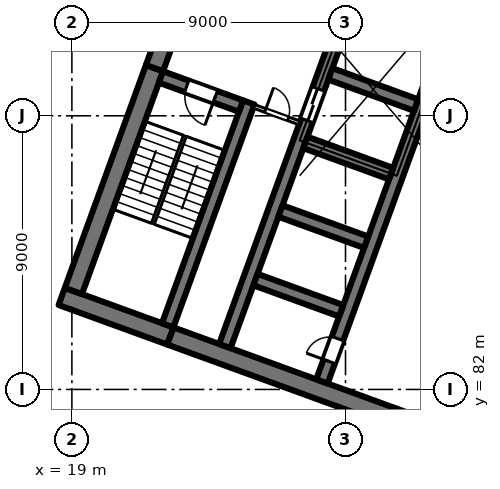
"""IFC4 building model, lengths in metres.
Left out: names, types, materials, properties, quantities, classifications, styles, units other than length and angle.
Written with IfcOpenShell. Run it as: python <this file> out.ifc"""

import sys

from ifc_helpers import new_model, si_unit, direction, frame, frame_2d, origin, place, context, subcontext, project, spatial, rectangle, extrude, element, fill, save


model = new_model("IFC4")
c1 = context("Model", 3, precision=1e-05, world=origin(), true_north=direction((0.0, 1.0)))
c2 = subcontext(c1, "Body", "Model", "MODEL_VIEW")
j1 = project(units=[si_unit("LENGTHUNIT", "METRE"), si_unit("PLANEANGLEUNIT", "RADIAN")], contexts=[c1])
p1 = place(None, origin())
s1 = spatial("IfcSite", under=j1, at=p1, CompositionType="ELEMENT")
p2 = place(p1, origin())
s2 = spatial("IfcBuilding", under=s1, at=p2, CompositionType="ELEMENT")
p3 = place(p2, frame((0.0, 0.0, 59.5)))
s3 = spatial("IfcBuildingStorey", under=s2, at=p3, CompositionType="ELEMENT", Elevation=59.5)
p4 = place(p3, frame((35.767, 78.835, 0.0), z_axis=(0.0, 0.0, 1.0), x_axis=(-0.939692894512, 0.342019391267, 0.0)))
e1 = element("IfcWall", 1, at=p4, inside=s3, PredefinedType="SHEAR", context=c2, shape_type="SweptSolid", body=[
    extrude(rectangle(XDim=14.4, YDim=0.6, at=frame_2d((7.2, 0.0))), origin(), (0.0, 0.0, 1.0), 4.0),
])
p5 = place(p3, frame((22.236, 83.76, 0.0), z_axis=(0.0, 0.0, 1.0), x_axis=(-0.939680822529, 0.342052557032, 0.0)))
e2 = element("IfcWall", 2, at=p5, inside=s3, PredefinedType="SHEAR", context=c2, shape_type="SweptSolid", body=[
    extrude(rectangle(XDim=3.8, YDim=0.6, at=frame_2d((1.9, 0.0))), origin(), (0.0, 0.0, 1.0), 4.0),
])
p6 = place(p3, frame((19.05, 85.239, 0.0), z_axis=(0.0, 0.0, 1.0), x_axis=(0.342016982193, 0.939693771338, 0.0)))
e3 = element("IfcWall", 3, at=p6, inside=s3, PredefinedType="SHEAR", context=c2, shape_type="SweptSolid", body=[
    extrude(rectangle(XDim=7.8, YDim=0.6, at=frame_2d((3.9, 0.0))), origin(), (0.0, 0.0, 1.0), 4.0),
])
p7 = place(p3, frame((21.717, 92.568, 0.0), z_axis=(0.0, 0.0, 1.0), x_axis=(0.342016162452, 0.939694069696, 0.0)))
e4 = element("IfcWall", 4, at=p7, inside=s3, PredefinedType="SHEAR", context=c2, shape_type="SweptSolid", body=[
    extrude(rectangle(XDim=8.9, YDim=0.6, at=frame_2d((4.45, 0.0))), origin(), (0.0, 0.0, 1.0), 4.0),
])
p8 = place(p3, frame((22.15, 84.11, 0.0), z_axis=(0.0, 0.0, 1.0), x_axis=(0.342016982193, 0.939693771338, 0.0)))
e5 = element("IfcWall", 5, at=p8, inside=s3, PredefinedType="SHEAR", context=c2, shape_type="SweptSolid", body=[
    extrude(rectangle(XDim=7.8, YDim=0.4, at=frame_2d((3.9, 0.0))), origin(), (0.0, 0.0, 1.0), 4.0),
])
p9 = place(p3, frame((24.562, 91.32, 0.0), z_axis=(0.0, 0.0, 1.0), x_axis=(-0.939717030584, 0.341953070509, 0.0)))
e6 = element("IfcWall", 6, at=p9, inside=s3, PredefinedType="SHEAR", context=c2, shape_type="SweptSolid", body=[
    extrude(rectangle(XDim=2.8, YDim=0.4, at=frame_2d((1.4, 0.0))), origin(), (0.0, 0.0, 1.0), 4.0),
])
p10 = place(p9, frame((0.9, 0.0, 0.0)))
e7 = element("IfcOpeningElement", 7, at=p10, cuts=e6, PredefinedType="OPENING", context=c2, shape_type="SweptSolid", body=[
    extrude(rectangle(XDim=1.0, YDim=2.1, at=frame_2d((0.5, 1.05))), frame((0.0, 0.21, 0.0), z_axis=(0.0, -1.0, 0.0), x_axis=(1.0, 0.0, 0.0)), (0.0, 0.0, 1.0), 0.42),
])
p11 = place(p3, frame((27.225, 82.263, 0.0), z_axis=(0.0, 0.0, 1.0), x_axis=(0.342014590177, 0.939694641948, 0.0)))
e8 = element("IfcWall", 8, at=p11, inside=s3, PredefinedType="SHEAR", context=c2, shape_type="SweptSolid", body=[
    extrude(rectangle(XDim=12.2, YDim=0.4, at=frame_2d((6.1, 0.0))), origin(), (0.0, 0.0, 1.0), 4.0),
])
p12 = place(p11, frame((10.25, 0.0, 0.0)))
e9 = element("IfcOpeningElement", 9, at=p12, cuts=e8, PredefinedType="OPENING", context=c2, shape_type="SweptSolid", body=[
    extrude(rectangle(XDim=1.1, YDim=2.1, at=frame_2d((0.55, 1.05))), frame((0.0, 0.21, 0.0), z_axis=(0.0, -1.0, 0.0), x_axis=(1.0, 0.0, 0.0)), (0.0, 0.0, 1.0), 0.42),
])
p13 = place(p11, frame((0.7, 0.0, 0.0)))
e10 = element("IfcOpeningElement", 10, at=p13, cuts=e8, PredefinedType="OPENING", context=c2, shape_type="SweptSolid", body=[
    extrude(rectangle(XDim=0.8, YDim=2.1, at=frame_2d((0.4, 1.05))), frame((0.0, 0.21, 0.0), z_axis=(0.0, -1.0, 0.0), x_axis=(1.0, 0.0, 0.0)), (0.0, 0.0, 1.0), 0.42),
])
p14 = place(p3, frame((24.03, 83.426, 0.0), z_axis=(0.0, 0.0, 1.0), x_axis=(0.342014590177, 0.939694641948, 0.0)))
e11 = element("IfcWall", 11, at=p14, inside=s3, PredefinedType="SHEAR", context=c2, shape_type="SweptSolid", body=[
    extrude(rectangle(XDim=12.2, YDim=0.4, at=frame_2d((6.1, 0.0))), origin(), (0.0, 0.0, 1.0), 4.0),
])
p15 = place(p14, frame((7.9, 0.0, 0.0)))
e12 = element("IfcOpeningElement", 12, at=p15, cuts=e11, PredefinedType="OPENING", context=c2, shape_type="SweptSolid", body=[
    extrude(rectangle(XDim=1.1, YDim=2.1, at=frame_2d((0.55, 1.05))), frame((0.0, 0.21, 0.0), z_axis=(0.0, -1.0, 0.0), x_axis=(1.0, 0.0, 0.0)), (0.0, 0.0, 1.0), 0.42),
])
p16 = place(p3, frame((27.858, 84.587, 0.0), z_axis=(0.0, 0.0, 1.0), x_axis=(-0.939686455819, 0.342037080957, 0.0)))
e13 = element("IfcWall", 13, at=p16, inside=s3, PredefinedType="SHEAR", context=c2, shape_type="SweptSolid", body=[
    extrude(rectangle(XDim=3.0, YDim=0.4, at=frame_2d((1.5, 0.0))), origin(), (0.0, 0.0, 1.0), 4.0),
])
p17 = place(p3, frame((28.678, 86.842, 0.0), z_axis=(0.0, 0.0, 1.0), x_axis=(-0.939676934218, 0.342063238742, 0.0)))
e14 = element("IfcWall", 14, at=p17, inside=s3, PredefinedType="SHEAR", context=c2, shape_type="SweptSolid", body=[
    extrude(rectangle(XDim=3.0, YDim=0.4, at=frame_2d((1.5, 0.0))), origin(), (0.0, 0.0, 1.0), 4.0),
])
for number, where, z_axis, x_axis in (
    (15, (29.5, 89.097, 0.0), (0.0, 0.0, 1.0), (-0.94, 0.342, 0.0)),
    (16, (30.32, 91.353, 0.0), (0.0, 0.0, 1.0), (-0.94, 0.342, 0.0)),
):
    element("IfcWall", number, at=place(p3, frame(where, z_axis=z_axis, x_axis=x_axis)), inside=s3, PredefinedType="SHEAR", context=c2, shape_type="SweptSolid", body=[
        extrude(rectangle(XDim=3.0, YDim=0.4, at=frame_2d((1.5, 0.0))), origin(), (0.0, 0.0, 1.0), 4.0),
    ])
p18 = place(p3, frame((24.985, 91.312, 0.0), z_axis=(0.0, 0.0, 1.0), x_axis=(0.939708740826, -0.341975850632, 0.0)))
e17 = element("IfcWall", 17, at=p18, inside=s3, PredefinedType="PARTITIONING", context=c2, shape_type="SweptSolid", body=[
    extrude(rectangle(XDim=1.6, YDim=0.125, at=frame_2d((0.8, 0.0))), origin(), (0.0, 0.0, 1.0), 3.625),
])
p19 = place(p18, frame((0.4, 0.0, 0.0)))
e18 = element("IfcOpeningElement", 18, at=p19, cuts=e17, PredefinedType="OPENING", context=c2, shape_type="SweptSolid", body=[
    extrude(rectangle(XDim=0.8, YDim=2.1, at=frame_2d((0.4, 1.05))), frame((0.0, 0.073, 0.0), z_axis=(0.0, -1.0, 0.0), x_axis=(1.0, 0.0, 0.0)), (0.0, 0.0, 1.0), 0.145),
])
p20 = place(p13, origin())
e19 = element("IfcDoor", 19, at=p20, inside=s3, OperationType="SINGLE_SWING_LEFT", PredefinedType="DOOR", context=c2, shape_type="SweptSolid", body=[
    extrude(rectangle(XDim=0.8, YDim=2.1, at=frame_2d((0.4, 1.05))), frame((0.0, 0.025, 0.0), z_axis=(0.0, -1.0, 0.0), x_axis=(1.0, 0.0, 0.0)), (0.0, 0.0, 1.0), 0.05),
])
fill(e10, e19)
p21 = place(p10, origin())
e20 = element("IfcDoor", 20, at=p21, inside=s3, OperationType="SINGLE_SWING_LEFT", PredefinedType="DOOR", context=c2, shape_type="SweptSolid", body=[
    extrude(rectangle(XDim=1.0, YDim=2.1, at=frame_2d((0.5, 1.05))), frame((0.0, 0.025, 0.0), z_axis=(0.0, -1.0, 0.0), x_axis=(1.0, 0.0, 0.0)), (0.0, 0.0, 1.0), 0.05),
])
fill(e7, e20)
p22 = place(p19, origin())
e21 = element("IfcDoor", 21, at=p22, inside=s3, OperationType="SINGLE_SWING_RIGHT", PredefinedType="DOOR", context=c2, shape_type="SweptSolid", body=[
    extrude(rectangle(XDim=0.8, YDim=2.1, at=frame_2d((0.4, 1.05))), frame((0.0, 0.025, 0.0), z_axis=(0.0, -1.0, 0.0), x_axis=(1.0, 0.0, 0.0)), (0.0, 0.0, 1.0), 0.05),
])
fill(e18, e21)
p23 = place(p15, origin())
e22 = element("IfcDoor", 22, at=p23, inside=s3, OperationType="DOUBLE_DOOR_SLIDING", PredefinedType="DOOR", context=c2, shape_type="SweptSolid", body=[
    extrude(rectangle(XDim=1.1, YDim=2.1, at=frame_2d((0.55, 1.05))), frame((0.0, 0.025, 0.0), z_axis=(0.0, -1.0, 0.0), x_axis=(1.0, 0.0, 0.0)), (0.0, 0.0, 1.0), 0.05),
])
fill(e12, e22)
save(model, sys.argv[1])
